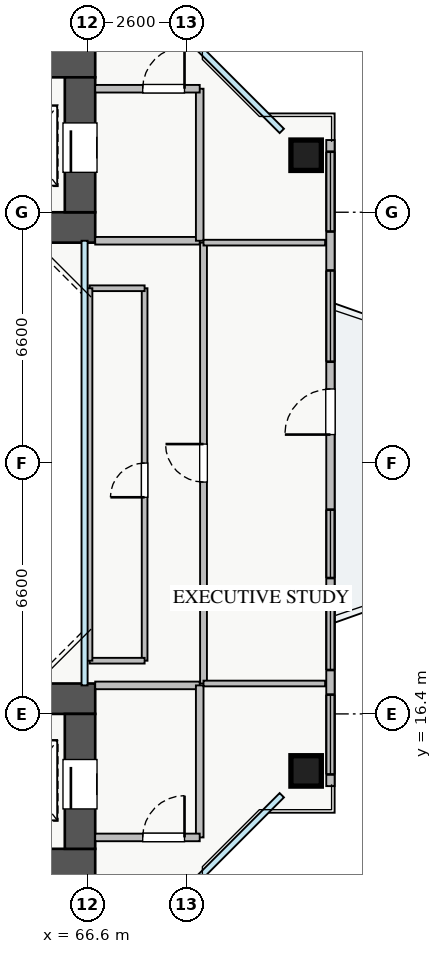
"""IFC4 building model, lengths in metres.
Left out: names, types, materials, properties, quantities, classifications, styles, units other than length and angle.
Written with IfcOpenShell. Run it as: python <this file> out.ifc"""

import sys

from ifc_helpers import new_model, si_unit, direction, frame, frame_2d, origin, origin_2d, place, context, subcontext, project, spatial, rectangle, extrude, source, transform, mapped, element, fill, save


model = new_model("IFC4")
c1 = context("Model", 3, precision=1e-05, world=origin(), true_north=direction((0.0, 1.0)))
c2 = subcontext(c1, "Body", "Model", "MODEL_VIEW")
j1 = project(units=[si_unit("LENGTHUNIT", "METRE"), si_unit("PLANEANGLEUNIT", "RADIAN")], contexts=[c1])
p1 = place(None, origin())
s1 = spatial("IfcSite", under=j1, at=p1, CompositionType="ELEMENT")
p2 = place(p1, origin())
s2 = spatial("IfcBuilding", under=s1, at=p2, CompositionType="ELEMENT")
p3 = place(p2, frame((0.0, 0.0, 86.0)))
s3 = spatial("IfcBuildingStorey", under=s2, at=p3, CompositionType="ELEMENT", Elevation=86.0)
p4 = place(p3, frame((54.2, 29.2, 0.0), z_axis=(0.0, 0.0, 1.0), x_axis=(1.0, 0.0, 0.0)))
e1 = element("IfcWall", 1, at=p4, inside=s3, PredefinedType="SHEAR", context=c2, shape_type="SweptSolid", body=[
    extrude(rectangle(XDim=12.6, YDim=0.8, at=frame_2d((6.3, 0.0))), origin(), (0.0, 0.0, 1.0), 3.25),
])
p5 = place(p3, frame((54.2, 33.55, 0.0), z_axis=(0.0, 0.0, 1.0), x_axis=(1.0, 0.0, 0.0)))
e2 = element("IfcWall", 2, at=p5, inside=s3, PredefinedType="SHEAR", context=c2, shape_type="SweptSolid", body=[
    extrude(rectangle(XDim=12.6, YDim=0.8, at=frame_2d((6.3, 0.0))), origin(), (0.0, 0.0, 1.0), 3.25),
])
p6 = place(p5, frame((8.2, 0.0, 0.0)))
e3 = element("IfcOpeningElement", 3, at=p6, cuts=e2, PredefinedType="OPENING", context=c2, shape_type="SweptSolid", body=[
    extrude(rectangle(XDim=1.1, YDim=2.05, at=frame_2d((0.55, 1.025))), frame((0.0, 0.41, 0.0), z_axis=(0.0, -1.0, 0.0), x_axis=(1.0, 0.0, 0.0)), (0.0, 0.0, 1.0), 0.82),
])
p7 = place(p3, frame((66.4, 29.6, 0.0), z_axis=(0.0, 0.0, 1.0), x_axis=(0.0, 1.0, 0.0)))
e4 = element("IfcWall", 4, at=p7, inside=s3, PredefinedType="SHEAR", context=c2, shape_type="SweptSolid", body=[
    extrude(rectangle(XDim=3.55, YDim=0.8, at=frame_2d((1.775, 0.0))), origin(), (0.0, 0.0, 1.0), 3.25),
])
p8 = place(p7, frame((1.05, 0.0, 0.0)))
e5 = element("IfcOpeningElement", 5, at=p8, cuts=e4, PredefinedType="OPENING", context=c2, shape_type="SweptSolid", body=[
    extrude(rectangle(XDim=1.3, YDim=2.05, at=frame_2d((0.65, 1.025))), frame((0.0, 0.41, 0.0), z_axis=(0.0, -1.0, 0.0), x_axis=(1.0, 0.0, 0.0)), (0.0, 0.0, 1.0), 0.82),
])
p9 = place(p3, frame((54.2, 12.45, 0.0), z_axis=(0.0, 0.0, 1.0), x_axis=(1.0, 0.0, 0.0)))
e6 = element("IfcWall", 6, at=p9, inside=s3, PredefinedType="SHEAR", context=c2, shape_type="SweptSolid", body=[
    extrude(rectangle(XDim=12.6, YDim=0.8, at=frame_2d((6.3, 0.0))), origin(), (0.0, 0.0, 1.0), 3.25),
])
p10 = place(p9, frame((8.2, 0.0, 0.0)))
e7 = element("IfcOpeningElement", 7, at=p10, cuts=e6, PredefinedType="OPENING", context=c2, shape_type="SweptSolid", body=[
    extrude(rectangle(XDim=1.1, YDim=2.05, at=frame_2d((0.55, 1.025))), frame((0.0, 0.41, 0.0), z_axis=(0.0, -1.0, 0.0), x_axis=(1.0, 0.0, 0.0)), (0.0, 0.0, 1.0), 0.82),
])
p11 = place(p3, frame((54.2, 16.8, 0.0), z_axis=(0.0, 0.0, 1.0), x_axis=(1.0, 0.0, 0.0)))
e8 = element("IfcWall", 8, at=p11, inside=s3, PredefinedType="SHEAR", context=c2, shape_type="SweptSolid", body=[
    extrude(rectangle(XDim=12.6, YDim=0.8, at=frame_2d((6.3, 0.0))), origin(), (0.0, 0.0, 1.0), 3.25),
])
p12 = place(p3, frame((66.4, 12.85, 0.0), z_axis=(0.0, 0.0, 1.0), x_axis=(0.0, 1.0, 0.0)))
e9 = element("IfcWall", 9, at=p12, inside=s3, PredefinedType="SHEAR", context=c2, shape_type="SweptSolid", body=[
    extrude(rectangle(XDim=3.55, YDim=0.8, at=frame_2d((1.775, 0.0))), origin(), (0.0, 0.0, 1.0), 3.25),
])
p13 = place(p12, frame((1.05, 0.0, 0.0)))
e10 = element("IfcOpeningElement", 10, at=p13, cuts=e9, PredefinedType="OPENING", context=c2, shape_type="SweptSolid", body=[
    extrude(rectangle(XDim=1.3, YDim=2.05, at=frame_2d((0.65, 1.025))), frame((0.0, 0.41, 0.0), z_axis=(0.0, -1.0, 0.0), x_axis=(1.0, 0.0, 0.0)), (0.0, 0.0, 1.0), 0.82),
])
m1 = source(origin(), c2, "Body", "SweptSolid", [
    extrude(rectangle(XDim=0.8, YDim=0.8, at=origin_2d()), origin(), (0.0, 0.0, 1.0), 3.25),
])
for number, where, z_axis, x_axis in (
    (11, (72.35, 14.9, 0.0), (0.0, 0.0, 1.0), (1.0, 0.0, 0.0)),
    (12, (72.35, 31.1, 0.0), (0.0, 0.0, 1.0), (1.0, 0.0, 0.0)),
):
    element("IfcColumn", number, at=place(p3, frame(where, z_axis=z_axis, x_axis=x_axis)), inside=s3, PredefinedType="COLUMN", context=c2, shape_type="MappedRepresentation", body=[
        mapped(m1, transform((0.0, 0.0, 0.0), x_axis=(1.0, 0.0, 0.0), y_axis=(0.0, 1.0, 0.0), z_axis=(0.0, 0.0, 1.0), scale=1.0)),
    ])
p14 = place(p3, frame((72.99, 14.5, 0.0), z_axis=(0.0, 0.0, 1.0), x_axis=(0.0, 1.0, 0.0)))
e13 = element("IfcWall", 13, at=p14, inside=s3, PredefinedType="STANDARD", context=c2, shape_type="SweptSolid", body=[
    extrude(rectangle(XDim=17.0, YDim=0.22, at=frame_2d((8.5, 0.0))), origin(), (0.0, 0.0, 1.0), 2.61),
])
p15 = place(p14, frame((9.25, 0.0, 0.0)))
e14 = element("IfcOpeningElement", 14, at=p15, cuts=e13, PredefinedType="OPENING", context=c2, shape_type="SweptSolid", body=[
    extrude(rectangle(XDim=1.2, YDim=2.1, at=frame_2d((0.6, 1.05))), frame((0.0, 0.12, 0.0), z_axis=(0.0, -1.0, 0.0), x_axis=(1.0, 0.0, 0.0)), (0.0, 0.0, 1.0), 0.24),
])
p16 = place(p14, frame((0.308, 0.0, 0.9)))
e15 = element("IfcOpeningElement", 15, at=p16, cuts=e13, PredefinedType="OPENING", context=c2, shape_type="SweptSolid", body=[
    extrude(rectangle(XDim=2.1, YDim=1.5, at=frame_2d((1.05, 0.75))), frame((0.0, 0.12, 0.0), z_axis=(0.0, -1.0, 0.0), x_axis=(1.0, 0.0, 0.0)), (0.0, 0.0, 1.0), 0.24),
])
p17 = place(p14, frame((5.475, 0.0, 0.9)))
e16 = element("IfcOpeningElement", 16, at=p17, cuts=e13, PredefinedType="OPENING", context=c2, shape_type="SweptSolid", body=[
    extrude(rectangle(XDim=1.8, YDim=1.45, at=frame_2d((0.9, 0.725))), frame((0.0, 0.12, 0.0), z_axis=(0.0, -1.0, 0.0), x_axis=(1.0, 0.0, 0.0)), (0.0, 0.0, 1.0), 0.24),
])
p18 = place(p14, frame((14.593, 0.0, 0.9)))
e17 = element("IfcOpeningElement", 17, at=p18, cuts=e13, PredefinedType="OPENING", context=c2, shape_type="SweptSolid", body=[
    extrude(rectangle(XDim=2.1, YDim=1.5, at=frame_2d((1.05, 0.75))), frame((0.0, 0.12, 0.0), z_axis=(0.0, -1.0, 0.0), x_axis=(1.0, 0.0, 0.0)), (0.0, 0.0, 1.0), 0.24),
])
p19 = place(p14, frame((3.055, 0.0, 0.9)))
e18 = element("IfcOpeningElement", 18, at=p19, cuts=e13, PredefinedType="OPENING", context=c2, shape_type="SweptSolid", body=[
    extrude(rectangle(XDim=2.1, YDim=1.5, at=frame_2d((1.05, 0.75))), frame((0.0, 0.12, 0.0), z_axis=(0.0, -1.0, 0.0), x_axis=(1.0, 0.0, 0.0)), (0.0, 0.0, 1.0), 0.24),
])
p20 = place(p14, frame((11.167, 0.0, 0.9)))
e19 = element("IfcOpeningElement", 19, at=p20, cuts=e13, PredefinedType="OPENING", context=c2, shape_type="SweptSolid", body=[
    extrude(rectangle(XDim=2.4, YDim=1.5, at=frame_2d((1.2, 0.75))), frame((0.0, 0.12, 0.0), z_axis=(0.0, -1.0, 0.0), x_axis=(1.0, 0.0, 0.0)), (0.0, 0.0, 1.0), 0.24),
])
p21 = place(p3, frame((66.8, 28.85, 0.0), z_axis=(0.0, 0.0, 1.0), x_axis=(1.0, 0.0, 0.0)))
e20 = element("IfcWall", 20, at=p21, inside=s3, PredefinedType="PARTITIONING", context=c2, shape_type="SweptSolid", body=[
    extrude(rectangle(XDim=2.75, YDim=0.2, at=frame_2d((1.375, 0.0))), origin(), (0.0, 0.0, 1.0), 3.07),
])
p22 = place(p3, frame((69.55, 28.85, 0.0), z_axis=(0.0, 0.0, 1.0), x_axis=(0.0, 1.0, 0.0)))
e21 = element("IfcWall", 21, at=p22, inside=s3, PredefinedType="PARTITIONING", context=c2, shape_type="SweptSolid", body=[
    extrude(rectangle(XDim=4.0, YDim=0.2, at=frame_2d((2.0, 0.0))), origin(), (0.0, 0.0, 1.0), 3.07),
])
p23 = place(p3, frame((66.8, 32.85, 0.0), z_axis=(0.0, 0.0, 1.0), x_axis=(1.0, 0.0, 0.0)))
e22 = element("IfcWall", 22, at=p23, inside=s3, PredefinedType="PARTITIONING", context=c2, shape_type="SweptSolid", body=[
    extrude(rectangle(XDim=2.75, YDim=0.2, at=frame_2d((1.375, 0.0))), origin(), (0.0, 0.0, 1.0), 3.07),
])
p24 = place(p23, frame((1.25, 0.0, 0.0)))
e23 = element("IfcOpeningElement", 23, at=p24, cuts=e22, PredefinedType="OPENING", context=c2, shape_type="SweptSolid", body=[
    extrude(rectangle(XDim=1.1, YDim=2.05, at=frame_2d((0.55, 1.025))), frame((0.0, 0.11, 0.0), z_axis=(0.0, -1.0, 0.0), x_axis=(1.0, 0.0, 0.0)), (0.0, 0.0, 1.0), 0.22),
])
p25 = place(p3, frame((66.8, 17.15, 0.0), z_axis=(0.0, 0.0, 1.0), x_axis=(1.0, 0.0, 0.0)))
e24 = element("IfcWall", 24, at=p25, inside=s3, PredefinedType="PARTITIONING", context=c2, shape_type="SweptSolid", body=[
    extrude(rectangle(XDim=2.75, YDim=0.2, at=frame_2d((1.375, 0.0))), origin(), (0.0, 0.0, 1.0), 3.07),
])
p26 = place(p3, frame((69.55, 13.15, 0.0), z_axis=(0.0, 0.0, 1.0), x_axis=(0.0, 1.0, 0.0)))
e25 = element("IfcWall", 25, at=p26, inside=s3, PredefinedType="PARTITIONING", context=c2, shape_type="SweptSolid", body=[
    extrude(rectangle(XDim=4.0, YDim=0.2, at=frame_2d((2.0, 0.0))), origin(), (0.0, 0.0, 1.0), 3.07),
])
p27 = place(p3, frame((66.8, 13.15, 0.0), z_axis=(0.0, 0.0, 1.0), x_axis=(1.0, 0.0, 0.0)))
e26 = element("IfcWall", 26, at=p27, inside=s3, PredefinedType="PARTITIONING", context=c2, shape_type="SweptSolid", body=[
    extrude(rectangle(XDim=2.75, YDim=0.2, at=frame_2d((1.375, 0.0))), origin(), (0.0, 0.0, 1.0), 3.07),
])
p28 = place(p27, frame((1.25, 0.0, 0.0)))
e27 = element("IfcOpeningElement", 27, at=p28, cuts=e26, PredefinedType="OPENING", context=c2, shape_type="SweptSolid", body=[
    extrude(rectangle(XDim=1.1, YDim=2.05, at=frame_2d((0.55, 1.025))), frame((0.0, 0.11, 0.0), z_axis=(0.0, -1.0, 0.0), x_axis=(1.0, 0.0, 0.0)), (0.0, 0.0, 1.0), 0.22),
])
p29 = place(p3, frame((69.65, 17.2, 0.0), z_axis=(0.0, 0.0, 1.0), x_axis=(0.0, 1.0, 0.0)))
e28 = element("IfcWall", 28, at=p29, inside=s3, PredefinedType="PARTITIONING", context=c2, shape_type="SweptSolid", body=[
    extrude(rectangle(XDim=11.6, YDim=0.18, at=frame_2d((5.8, 0.0))), origin(), (0.0, 0.0, 1.0), 3.07),
])
p30 = place(p29, frame((5.3, 0.0, 0.0)))
e29 = element("IfcOpeningElement", 29, at=p30, cuts=e28, PredefinedType="OPENING", context=c2, shape_type="SweptSolid", body=[
    extrude(rectangle(XDim=1.0, YDim=2.05, at=frame_2d((0.5, 1.025))), frame((0.0, 0.1, 0.0), z_axis=(0.0, -1.0, 0.0), x_axis=(1.0, 0.0, 0.0)), (0.0, 0.0, 1.0), 0.2),
])
for number, where, z_axis, x_axis in (
    (30, (69.65, 17.2, 0.0), (0.0, 0.0, 1.0), (1.0, 0.0, 0.0)),
    (31, (69.65, 28.8, 0.0), (0.0, 0.0, 1.0), (1.0, 0.0, 0.0)),
):
    element("IfcWall", number, at=place(p3, frame(where, z_axis=z_axis, x_axis=x_axis)), inside=s3, PredefinedType="PARTITIONING", context=c2, shape_type="SweptSolid", body=[
        extrude(rectangle(XDim=3.2, YDim=0.15, at=frame_2d((1.6, 0.0))), origin(), (0.0, 0.0, 1.0), 3.07),
    ])
p31 = place(p3, frame((68.1, 17.8, 0.0), z_axis=(0.0, 0.0, 1.0), x_axis=(0.0, 1.0, 0.0)))
e32 = element("IfcWall", 32, at=p31, inside=s3, PredefinedType="PARTITIONING", context=c2, shape_type="SweptSolid", body=[
    extrude(rectangle(XDim=9.8, YDim=0.15, at=frame_2d((4.9, 0.0))), origin(), (0.0, 0.0, 1.0), 3.07),
])
p32 = place(p31, frame((4.3, 0.0, 0.0)))
e33 = element("IfcOpeningElement", 33, at=p32, cuts=e32, PredefinedType="OPENING", context=c2, shape_type="SweptSolid", body=[
    extrude(rectangle(XDim=0.9, YDim=2.05, at=frame_2d((0.45, 1.025))), frame((0.0, 0.085, 0.0), z_axis=(0.0, -1.0, 0.0), x_axis=(1.0, 0.0, 0.0)), (0.0, 0.0, 1.0), 0.17),
])
p33 = place(p3, frame((66.65, 27.6, 0.0), z_axis=(0.0, 0.0, 1.0), x_axis=(1.0, 0.0, 0.0)))
e34 = element("IfcWall", 34, at=p33, inside=s3, PredefinedType="PARTITIONING", context=c2, shape_type="SweptSolid", body=[
    extrude(rectangle(XDim=1.45, YDim=0.15, at=frame_2d((0.725, 0.0))), origin(), (0.0, 0.0, 1.0), 2.815),
])
p34 = place(p3, frame((66.65, 17.8, 0.0), z_axis=(0.0, 0.0, 1.0), x_axis=(1.0, 0.0, 0.0)))
e35 = element("IfcWall", 35, at=p34, inside=s3, PredefinedType="PARTITIONING", context=c2, shape_type="SweptSolid", body=[
    extrude(rectangle(XDim=1.45, YDim=0.15, at=frame_2d((0.725, 0.0))), origin(), (0.0, 0.0, 1.0), 3.07),
])
p35 = place(p3, frame((66.65, 17.8, 0.0), z_axis=(0.0, 0.0, 1.0), x_axis=(0.0, 1.0, 0.0)))
e36 = element("IfcWall", 36, at=p35, inside=s3, PredefinedType="PARTITIONING", context=c2, shape_type="SweptSolid", body=[
    extrude(rectangle(XDim=9.8, YDim=0.15, at=frame_2d((4.9, 0.0))), origin(), (0.0, 0.0, 1.0), 2.665),
])
m2 = source(origin(), c2, "Body", "SweptSolid", [
    extrude(rectangle(XDim=1.2, YDim=2.1, at=frame_2d((0.6, 1.05))), frame((0.0, 0.025, 0.0), z_axis=(0.0, -1.0, 0.0), x_axis=(1.0, 0.0, 0.0)), (0.0, 0.0, 1.0), 0.05),
])
p36 = place(p15, origin())
e37 = element("IfcDoor", 37, at=p36, inside=s3, OperationType="SINGLE_SWING_LEFT", PredefinedType="DOOR", context=c2, shape_type="MappedRepresentation", body=[
    mapped(m2, transform((0.0, 0.0, 0.0), x_axis=(1.0, 0.0, 0.0), y_axis=(0.0, 1.0, 0.0), z_axis=(0.0, 0.0, 1.0), scale=1.0)),
])
fill(e14, e37)
m3 = source(origin(), c2, "Body", "SweptSolid", [
    extrude(rectangle(XDim=2.1, YDim=1.5, at=frame_2d((1.05, 0.75))), frame((0.0, 0.03, 0.0), z_axis=(0.0, -1.0, 0.0), x_axis=(1.0, 0.0, 0.0)), (0.0, 0.0, 1.0), 0.06),
])
p37 = place(p16, origin())
e38 = element("IfcWindow", 38, at=p37, inside=s3, PartitioningType="TRIPLE_PANEL_VERTICAL", PredefinedType="WINDOW", context=c2, shape_type="MappedRepresentation", body=[
    mapped(m3, transform((0.0, 0.0, 0.0), x_axis=(1.0, 0.0, 0.0), y_axis=(0.0, 1.0, 0.0), z_axis=(0.0, 0.0, 1.0), scale=1.0)),
])
fill(e15, e38)
m4 = source(origin(), c2, "Body", "SweptSolid", [
    extrude(rectangle(XDim=1.8, YDim=1.45, at=frame_2d((0.9, 0.725))), frame((0.0, 0.03, 0.0), z_axis=(0.0, -1.0, 0.0), x_axis=(1.0, 0.0, 0.0)), (0.0, 0.0, 1.0), 0.06),
])
p38 = place(p17, origin())
e39 = element("IfcWindow", 39, at=p38, inside=s3, PartitioningType="DOUBLE_PANEL_VERTICAL", PredefinedType="WINDOW", context=c2, shape_type="MappedRepresentation", body=[
    mapped(m4, transform((0.0, 0.0, 0.0), x_axis=(1.0, 0.0, 0.0), y_axis=(0.0, 1.0, 0.0), z_axis=(0.0, 0.0, 1.0), scale=1.0)),
])
fill(e16, e39)
p39 = place(p18, origin())
e40 = element("IfcWindow", 40, at=p39, inside=s3, PartitioningType="TRIPLE_PANEL_VERTICAL", PredefinedType="WINDOW", context=c2, shape_type="MappedRepresentation", body=[
    mapped(m3, transform((0.0, 0.0, 0.0), x_axis=(1.0, 0.0, 0.0), y_axis=(0.0, 1.0, 0.0), z_axis=(0.0, 0.0, 1.0), scale=1.0)),
])
fill(e17, e40)
m5 = source(origin(), c2, "Body", "SweptSolid", [
    extrude(rectangle(XDim=1.3, YDim=2.05, at=frame_2d((0.65, 1.025))), frame((0.0, 0.025, 0.0), z_axis=(0.0, -1.0, 0.0), x_axis=(1.0, 0.0, 0.0)), (0.0, 0.0, 1.0), 0.05),
])
p40 = place(p8, origin())
e41 = element("IfcDoor", 41, at=p40, inside=s3, OperationType="SLIDING_TO_LEFT", PredefinedType="DOOR", context=c2, shape_type="MappedRepresentation", body=[
    mapped(m5, transform((0.0, 0.0, 0.0), x_axis=(1.0, 0.0, 0.0), y_axis=(0.0, 1.0, 0.0), z_axis=(0.0, 0.0, 1.0), scale=1.0)),
])
fill(e5, e41)
p41 = place(p13, origin())
e42 = element("IfcDoor", 42, at=p41, inside=s3, OperationType="SLIDING_TO_RIGHT", PredefinedType="DOOR", context=c2, shape_type="MappedRepresentation", body=[
    mapped(m5, transform((0.0, 0.0, 0.0), x_axis=(1.0, 0.0, 0.0), y_axis=(0.0, 1.0, 0.0), z_axis=(0.0, 0.0, 1.0), scale=1.0)),
])
fill(e10, e42)
m6 = source(origin(), c2, "Body", "SweptSolid", [
    extrude(rectangle(XDim=1.1, YDim=2.05, at=frame_2d((0.55, 1.025))), frame((0.0, 0.025, 0.0), z_axis=(0.0, -1.0, 0.0), x_axis=(1.0, 0.0, 0.0)), (0.0, 0.0, 1.0), 0.05),
])
p42 = place(p24, origin())
e43 = element("IfcDoor", 43, at=p42, inside=s3, OperationType="SINGLE_SWING_RIGHT", PredefinedType="DOOR", context=c2, shape_type="MappedRepresentation", body=[
    mapped(m6, transform((0.0, 0.0, 0.0), x_axis=(1.0, 0.0, 0.0), y_axis=(0.0, 1.0, 0.0), z_axis=(0.0, 0.0, 1.0), scale=1.0)),
])
fill(e23, e43)
p43 = place(p28, origin())
e44 = element("IfcDoor", 44, at=p43, inside=s3, OperationType="SINGLE_SWING_RIGHT", PredefinedType="DOOR", context=c2, shape_type="MappedRepresentation", body=[
    mapped(m6, transform((0.0, 0.0, 0.0), x_axis=(1.0, 0.0, 0.0), y_axis=(0.0, 1.0, 0.0), z_axis=(0.0, 0.0, 1.0), scale=1.0)),
])
fill(e27, e44)
m7 = source(origin(), c2, "Body", "SweptSolid", [
    extrude(rectangle(XDim=1.0, YDim=2.05, at=frame_2d((0.5, 1.025))), frame((0.0, 0.025, 0.0), z_axis=(0.0, -1.0, 0.0), x_axis=(1.0, 0.0, 0.0)), (0.0, 0.0, 1.0), 0.05),
])
p44 = place(p30, origin())
e45 = element("IfcDoor", 45, at=p44, inside=s3, OperationType="SINGLE_SWING_RIGHT", PredefinedType="DOOR", context=c2, shape_type="MappedRepresentation", body=[
    mapped(m7, transform((0.0, 0.0, 0.0), x_axis=(1.0, 0.0, 0.0), y_axis=(0.0, 1.0, 0.0), z_axis=(0.0, 0.0, 1.0), scale=1.0)),
])
fill(e29, e45)
m8 = source(origin(), c2, "Body", "SweptSolid", [
    extrude(rectangle(XDim=0.9, YDim=2.05, at=frame_2d((0.45, 1.025))), frame((0.0, 0.025, 0.0), z_axis=(0.0, -1.0, 0.0), x_axis=(1.0, 0.0, 0.0)), (0.0, 0.0, 1.0), 0.05),
])
p45 = place(p32, origin())
e46 = element("IfcDoor", 46, at=p45, inside=s3, OperationType="SINGLE_SWING_LEFT", PredefinedType="DOOR", context=c2, shape_type="MappedRepresentation", body=[
    mapped(m8, transform((0.0, 0.0, 0.0), x_axis=(1.0, 0.0, 0.0), y_axis=(0.0, 1.0, 0.0), z_axis=(0.0, 0.0, 1.0), scale=1.0)),
])
fill(e33, e46)
p46 = place(p19, origin())
e47 = element("IfcWindow", 47, at=p46, inside=s3, PartitioningType="TRIPLE_PANEL_VERTICAL", PredefinedType="WINDOW", context=c2, shape_type="MappedRepresentation", body=[
    mapped(m3, transform((0.0, 0.0, 0.0), x_axis=(1.0, 0.0, 0.0), y_axis=(0.0, 1.0, 0.0), z_axis=(0.0, 0.0, 1.0), scale=1.0)),
])
fill(e18, e47)
m9 = source(origin(), c2, "Body", "SweptSolid", [
    extrude(rectangle(XDim=2.4, YDim=1.5, at=frame_2d((1.2, 0.75))), frame((0.0, 0.03, 0.0), z_axis=(0.0, -1.0, 0.0), x_axis=(1.0, 0.0, 0.0)), (0.0, 0.0, 1.0), 0.06),
])
p47 = place(p20, origin())
e48 = element("IfcWindow", 48, at=p47, inside=s3, PartitioningType="TRIPLE_PANEL_VERTICAL", PredefinedType="WINDOW", context=c2, shape_type="MappedRepresentation", body=[
    mapped(m9, transform((0.0, 0.0, 0.0), x_axis=(1.0, 0.0, 0.0), y_axis=(0.0, 1.0, 0.0), z_axis=(0.0, 0.0, 1.0), scale=1.0)),
])
fill(e19, e48)
save(model, sys.argv[1])
